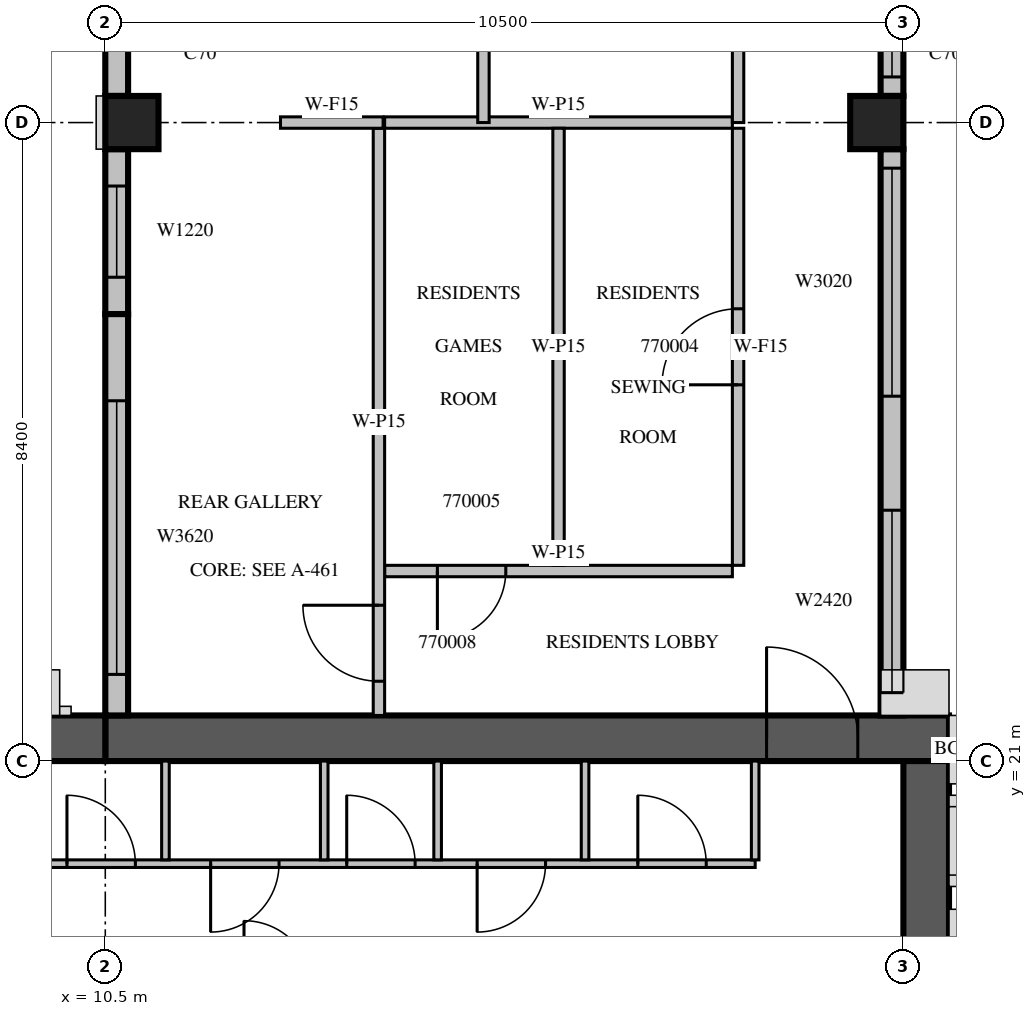
"""IFC4 building model, lengths in metres.
Left out: names, types, materials, properties, quantities, classifications, styles, units other than length and angle.
Written with IfcOpenShell. Run it as: python <this file> out.ifc"""

import sys

from ifc_helpers import new_model, si_unit, direction, frame, frame_2d, origin, origin_2d, place, context, subcontext, project, spatial, rectangle, extrude, source, transform, mapped, element, fill, save


model = new_model("IFC4")
c1 = context("Model", 3, precision=1e-05, world=origin(), true_north=direction((0.0, 1.0)))
c2 = subcontext(c1, "Body", "Model", "MODEL_VIEW")
j1 = project(units=[si_unit("LENGTHUNIT", "METRE"), si_unit("PLANEANGLEUNIT", "RADIAN")], contexts=[c1])
p1 = place(None, origin())
s1 = spatial("IfcSite", under=j1, at=p1, CompositionType="ELEMENT")
p2 = place(p1, origin())
s2 = spatial("IfcBuilding", under=s1, at=p2, CompositionType="ELEMENT")
p3 = place(p2, frame((0.0, 0.0, 305.5)))
s3 = spatial("IfcBuildingStorey", under=s2, at=p3, CompositionType="ELEMENT", Elevation=305.5)
m1 = source(origin(), c2, "Body", "SweptSolid", [
    extrude(rectangle(XDim=0.7, YDim=0.7, at=origin_2d()), origin(), (0.0, 0.0, 1.0), 3.5),
])
for number, where, z_axis, x_axis in (
    (1, (10.85, 29.4, 0.0), (0.0, 0.0, 1.0), (1.0, 0.0, 0.0)),
    (2, (20.65, 29.4, 0.0), (0.0, 0.0, 1.0), (1.0, 0.0, 0.0)),
):
    element("IfcColumn", number, at=place(p3, frame(where, z_axis=z_axis, x_axis=x_axis)), inside=s3, PredefinedType="COLUMN", context=c2, shape_type="MappedRepresentation", body=[
        mapped(m1, transform((0.0, 0.0, 0.0), scale=1.0)),
    ])
m2 = source(origin(), c2, "Body", "SweptSolid", [
    extrude(rectangle(XDim=11.1, YDim=0.6, at=frame_2d((5.55, 0.0))), origin(), (0.0, 0.0, 1.0), 3.5),
])
p4 = place(p3, frame((10.5, 21.3, 0.0), z_axis=(0.0, 0.0, 1.0), x_axis=(1.0, 0.0, 0.0)))
e3 = element("IfcWall", 3, at=p4, inside=s3, PredefinedType="SHEAR", context=c2, shape_type="MappedRepresentation", body=[
    mapped(m2, transform((0.0, 0.0, 0.0), scale=1.0)),
])
m3 = source(origin(), c2, "Body", "SweptSolid", [
    extrude(rectangle(XDim=1.2, YDim=2.1, at=frame_2d((0.6, 1.05))), frame((0.0, 0.31, 0.0), z_axis=(0.0, -1.0, 0.0), x_axis=(1.0, 0.0, 0.0)), (0.0, 0.0, 1.0), 0.62),
])
p5 = place(p4, frame((8.7, 0.0, 0.0)))
e4 = element("IfcOpeningElement", 4, at=p5, cuts=e3, PredefinedType="OPENING", context=c2, shape_type="MappedRepresentation", body=[
    mapped(m3, transform((0.0, 0.0, 0.0), scale=1.0)),
])
m4 = source(origin(), c2, "Body", "SweptSolid", [
    extrude(rectangle(XDim=10.5, YDim=0.6, at=frame_2d((5.25, 0.0))), origin(), (0.0, 0.0, 1.0), 3.5),
])
p6 = place(p3, frame((21.3, 10.5, 0.0), z_axis=(0.0, 0.0, 1.0), x_axis=(0.0, 1.0, 0.0)))
e5 = element("IfcWall", 5, at=p6, inside=s3, PredefinedType="SHEAR", context=c2, shape_type="MappedRepresentation", body=[
    mapped(m4, transform((0.0, 0.0, 0.0), scale=1.0)),
])
m5 = source(origin(), c2, "Body", "SweptSolid", [
    extrude(rectangle(XDim=1.2, YDim=2.4, at=frame_2d((0.6, 1.2))), frame((0.0, 0.31, 0.0), z_axis=(0.0, -1.0, 0.0), x_axis=(1.0, 0.0, 0.0)), (0.0, 0.0, 1.0), 0.62),
])
p7 = place(p6, frame((5.7, 0.0, 0.6)))
e6 = element("IfcOpeningElement", 6, at=p7, cuts=e5, PredefinedType="OPENING", context=c2, shape_type="MappedRepresentation", body=[
    mapped(m5, transform((0.0, 0.0, 0.0), scale=1.0)),
])
m6 = source(origin(), c2, "Body", "SweptSolid", [
    extrude(rectangle(XDim=6.6, YDim=0.6, at=frame_2d((3.3, 0.0))), origin(), (0.0, 0.0, 1.0), 3.5),
])
p8 = place(p3, frame((3.9, 21.3, 0.0), z_axis=(0.0, 0.0, 1.0), x_axis=(1.0, 0.0, 0.0)))
e7 = element("IfcWall", 7, at=p8, inside=s3, PredefinedType="SHEAR", context=c2, shape_type="MappedRepresentation", body=[
    mapped(m6, transform((0.0, 0.0, 0.0), scale=1.0)),
])
p9 = place(p8, frame((1.5, 0.0, 0.6)))
e8 = element("IfcOpeningElement", 8, at=p9, cuts=e7, PredefinedType="OPENING", context=c2, shape_type="MappedRepresentation", body=[
    mapped(m5, transform((0.0, 0.0, 0.0), scale=1.0)),
])
p10 = place(p8, frame((3.6, 0.0, 0.6)))
e9 = element("IfcOpeningElement", 9, at=p10, cuts=e7, PredefinedType="OPENING", context=c2, shape_type="MappedRepresentation", body=[
    mapped(m5, transform((0.0, 0.0, 0.0), scale=1.0)),
])
m7 = source(origin(), c2, "Body", "SweptSolid", [
    extrude(rectangle(XDim=7.45, YDim=0.3, at=frame_2d((3.725, 0.0))), origin(), (0.0, 0.0, 1.0), 3.1),
])
p11 = place(p3, frame((20.85, 21.6, 0.0), z_axis=(0.0, 0.0, 1.0), x_axis=(0.0, 1.0, 0.0)))
e10 = element("IfcWall", 10, at=p11, inside=s3, PredefinedType="STANDARD", context=c2, shape_type="MappedRepresentation", body=[
    mapped(m7, transform((0.0, 0.0, 0.0), scale=1.0)),
])
m8 = source(origin(), c2, "Body", "SweptSolid", [
    extrude(rectangle(XDim=2.4, YDim=2.0, at=frame_2d((1.2, 1.0))), frame((0.0, 0.16, 0.0), z_axis=(0.0, -1.0, 0.0), x_axis=(1.0, 0.0, 0.0)), (0.0, 0.0, 1.0), 0.32),
])
p12 = place(p11, frame((0.3, 0.0, 0.6)))
e11 = element("IfcOpeningElement", 11, at=p12, cuts=e10, PredefinedType="OPENING", context=c2, shape_type="MappedRepresentation", body=[
    mapped(m8, transform((0.0, 0.0, 0.0), scale=1.0)),
])
m9 = source(origin(), c2, "Body", "SweptSolid", [
    extrude(rectangle(XDim=3.0, YDim=2.0, at=frame_2d((1.5, 1.0))), frame((0.0, 0.16, 0.0), z_axis=(0.0, -1.0, 0.0), x_axis=(1.0, 0.0, 0.0)), (0.0, 0.0, 1.0), 0.32),
])
p13 = place(p11, frame((4.2, 0.0, 0.6)))
e12 = element("IfcOpeningElement", 12, at=p13, cuts=e10, PredefinedType="OPENING", context=c2, shape_type="MappedRepresentation", body=[
    mapped(m9, transform((0.0, 0.0, 0.0), scale=1.0)),
])
m10 = source(origin(), c2, "Body", "SweptSolid", [
    extrude(rectangle(XDim=7.7, YDim=0.3, at=frame_2d((3.85, 0.0))), origin(), (0.0, 0.0, 1.0), 3.1),
])
p14 = place(p3, frame((20.85, 29.75, 0.0), z_axis=(0.0, 0.0, 1.0), x_axis=(0.0, 1.0, 0.0)))
e13 = element("IfcWall", 13, at=p14, inside=s3, PredefinedType="STANDARD", context=c2, shape_type="MappedRepresentation", body=[
    mapped(m10, transform((0.0, 0.0, 0.0), scale=1.0)),
])
p15 = place(p14, frame((0.25, 0.0, 0.6)))
e14 = element("IfcOpeningElement", 14, at=p15, cuts=e13, PredefinedType="OPENING", context=c2, shape_type="MappedRepresentation", body=[
    mapped(m9, transform((0.0, 0.0, 0.0), scale=1.0)),
])
p16 = place(p14, frame((4.45, 0.0, 0.6)))
e15 = element("IfcOpeningElement", 15, at=p16, cuts=e13, PredefinedType="OPENING", context=c2, shape_type="MappedRepresentation", body=[
    mapped(m9, transform((0.0, 0.0, 0.0), scale=1.0)),
])
m11 = source(origin(), c2, "Body", "SweptSolid", [
    extrude(rectangle(XDim=1.33, YDim=0.3, at=frame_2d((0.665, 0.0))), origin(), (0.0, 0.0, 1.0), 3.1),
])
p17 = place(p3, frame((10.65, 31.08, 0.0), z_axis=(0.0, 0.0, 1.0), x_axis=(0.0, -1.0, 0.0)))
e16 = element("IfcWall", 16, at=p17, inside=s3, PredefinedType="STANDARD", context=c2, shape_type="MappedRepresentation", body=[
    mapped(m11, transform((0.0, 0.0, 0.0), scale=1.0)),
])
m12 = source(origin(), c2, "Body", "SweptSolid", [
    extrude(rectangle(XDim=2.17, YDim=0.3, at=frame_2d((1.085, 0.0))), origin(), (0.0, 0.0, 1.0), 3.1),
])
p18 = place(p3, frame((10.65, 29.05, 0.0), z_axis=(0.0, 0.0, 1.0), x_axis=(0.0, -1.0, 0.0)))
e17 = element("IfcWall", 17, at=p18, inside=s3, PredefinedType="STANDARD", context=c2, shape_type="MappedRepresentation", body=[
    mapped(m12, transform((0.0, 0.0, 0.0), scale=1.0)),
])
m13 = source(origin(), c2, "Body", "SweptSolid", [
    extrude(rectangle(XDim=1.2, YDim=2.0, at=frame_2d((0.6, 1.0))), frame((0.0, 0.16, 0.0), z_axis=(0.0, -1.0, 0.0), x_axis=(1.0, 0.0, 0.0)), (0.0, 0.0, 1.0), 0.32),
])
p19 = place(p18, frame((0.485, 0.0, 0.6)))
e18 = element("IfcOpeningElement", 18, at=p19, cuts=e17, PredefinedType="OPENING", context=c2, shape_type="MappedRepresentation", body=[
    mapped(m13, transform((0.0, 0.0, 0.0), scale=1.0)),
])
m14 = source(origin(), c2, "Body", "SweptSolid", [
    extrude(rectangle(XDim=5.28, YDim=0.3, at=frame_2d((2.64, 0.0))), origin(), (0.0, 0.0, 1.0), 3.1),
])
p20 = place(p3, frame((10.65, 26.88, 0.0), z_axis=(0.0, 0.0, 1.0), x_axis=(0.0, -1.0, 0.0)))
e19 = element("IfcWall", 19, at=p20, inside=s3, PredefinedType="STANDARD", context=c2, shape_type="MappedRepresentation", body=[
    mapped(m14, transform((0.0, 0.0, 0.0), scale=1.0)),
])
m15 = source(origin(), c2, "Body", "SweptSolid", [
    extrude(rectangle(XDim=3.6, YDim=2.0, at=frame_2d((1.8, 1.0))), frame((0.0, 0.16, 0.0), z_axis=(0.0, -1.0, 0.0), x_axis=(1.0, 0.0, 0.0)), (0.0, 0.0, 1.0), 0.32),
])
p21 = place(p20, frame((1.14, 0.0, 0.6)))
e20 = element("IfcOpeningElement", 20, at=p21, cuts=e19, PredefinedType="OPENING", context=c2, shape_type="MappedRepresentation", body=[
    mapped(m15, transform((0.0, 0.0, 0.0), scale=1.0)),
])
m16 = source(origin(), c2, "Body", "SweptSolid", [
    extrude(rectangle(XDim=9.4, YDim=0.1, at=frame_2d((4.7, 0.0))), origin(), (0.0, 0.0, 1.0), 3.1),
])
p22 = place(p3, frame((9.65, 19.65, 0.0), z_axis=(0.0, 0.0, 1.0), x_axis=(1.0, 0.0, 0.0)))
e21 = element("IfcWall", 21, at=p22, inside=s3, PredefinedType="PARTITIONING", context=c2, shape_type="MappedRepresentation", body=[
    mapped(m16, transform((0.0, 0.0, 0.0), scale=1.0)),
])
m17 = source(origin(), c2, "Body", "SweptSolid", [
    extrude(rectangle(XDim=0.9, YDim=2.1, at=frame_2d((0.45, 1.05))), frame((0.0, 0.06, 0.0), z_axis=(0.0, -1.0, 0.0), x_axis=(1.0, 0.0, 0.0)), (0.0, 0.0, 1.0), 0.12),
])
p23 = place(p22, frame((0.346, 0.0, 0.0)))
e22 = element("IfcOpeningElement", 22, at=p23, cuts=e21, PredefinedType="OPENING", context=c2, shape_type="MappedRepresentation", body=[
    mapped(m17, transform((0.0, 0.0, 0.0), scale=1.0)),
])
p24 = place(p22, frame((2.236, 0.0, 0.0)))
e23 = element("IfcOpeningElement", 23, at=p24, cuts=e21, PredefinedType="OPENING", context=c2, shape_type="MappedRepresentation", body=[
    mapped(m17, transform((0.0, 0.0, 0.0), scale=1.0)),
])
p25 = place(p22, frame((4.026, 0.0, 0.0)))
e24 = element("IfcOpeningElement", 24, at=p25, cuts=e21, PredefinedType="OPENING", context=c2, shape_type="MappedRepresentation", body=[
    mapped(m17, transform((0.0, 0.0, 0.0), scale=1.0)),
])
p26 = place(p22, frame((5.742, 0.0, 0.0)))
e25 = element("IfcOpeningElement", 25, at=p26, cuts=e21, PredefinedType="OPENING", context=c2, shape_type="MappedRepresentation", body=[
    mapped(m17, transform((0.0, 0.0, 0.0), scale=1.0)),
])
p27 = place(p22, frame((7.856, 0.0, 0.0)))
e26 = element("IfcOpeningElement", 26, at=p27, cuts=e21, PredefinedType="OPENING", context=c2, shape_type="MappedRepresentation", body=[
    mapped(m17, transform((0.0, 0.0, 0.0), scale=1.0)),
])
m18 = source(origin(), c2, "Body", "SweptSolid", [
    extrude(rectangle(XDim=1.3, YDim=0.1, at=frame_2d((0.65, 0.0))), origin(), (0.0, 0.0, 1.0), 3.1),
])
for number, where, z_axis, x_axis in (
    (27, (11.291, 19.7, 0.0), (0.0, 0.0, 1.0), (0.0, 1.0, 0.0)),
    (28, (13.38, 19.7, 0.0), (0.0, 0.0, 1.0), (0.0, 1.0, 0.0)),
    (29, (14.872, 19.7, 0.0), (0.0, 0.0, 1.0), (0.0, 1.0, 0.0)),
    (30, (16.812, 19.7, 0.0), (0.0, 0.0, 1.0), (0.0, 1.0, 0.0)),
    (31, (19.05, 19.7, 0.0), (0.0, 0.0, 1.0), (0.0, 1.0, 0.0)),
):
    element("IfcWall", number, at=place(p3, frame(where, z_axis=z_axis, x_axis=x_axis)), inside=s3, PredefinedType="PARTITIONING", context=c2, shape_type="MappedRepresentation", body=[
        mapped(m18, transform((0.0, 0.0, 0.0), scale=1.0)),
    ])
m19 = source(origin(), c2, "Body", "SweptSolid", [
    extrude(rectangle(XDim=4.575, YDim=0.15, at=frame_2d((2.288, 0.0))), origin(), (0.0, 0.0, 1.0), 3.1),
])
p28 = place(p3, frame((14.175, 23.5, 0.0), z_axis=(0.0, 0.0, 1.0), x_axis=(1.0, 0.0, 0.0)))
e32 = element("IfcWall", 32, at=p28, inside=s3, PredefinedType="PARTITIONING", context=c2, shape_type="MappedRepresentation", body=[
    mapped(m19, transform((0.0, 0.0, 0.0), scale=1.0)),
])
m20 = source(origin(), c2, "Body", "SweptSolid", [
    extrude(rectangle(XDim=0.9, YDim=2.1, at=frame_2d((0.45, 1.05))), frame((0.0, 0.085, 0.0), z_axis=(0.0, -1.0, 0.0), x_axis=(1.0, 0.0, 0.0)), (0.0, 0.0, 1.0), 0.17),
])
p29 = place(p28, frame((0.694, 0.0, 0.0)))
e33 = element("IfcOpeningElement", 33, at=p29, cuts=e32, PredefinedType="OPENING", context=c2, shape_type="MappedRepresentation", body=[
    mapped(m20, transform((0.0, 0.0, 0.0), scale=1.0)),
])
p30 = place(p3, frame((18.75, 29.4, 0.0), z_axis=(0.0, 0.0, 1.0), x_axis=(-1.0, 0.0, 0.0)))
e34 = element("IfcWall", 34, at=p30, inside=s3, PredefinedType="PARTITIONING", context=c2, shape_type="MappedRepresentation", body=[
    mapped(m19, transform((0.0, 0.0, 0.0), scale=1.0)),
])
m21 = source(origin(), c2, "Body", "SweptSolid", [
    extrude(rectangle(XDim=5.75, YDim=0.15, at=frame_2d((2.875, 0.0))), origin(), (0.0, 0.0, 1.0), 3.1),
])
p31 = place(p3, frame((18.825, 23.575, 0.0), z_axis=(0.0, 0.0, 1.0), x_axis=(0.0, 1.0, 0.0)))
e35 = element("IfcWall", 35, at=p31, inside=s3, PredefinedType="PARTITIONING", context=c2, shape_type="MappedRepresentation", body=[
    mapped(m21, transform((0.0, 0.0, 0.0), scale=1.0)),
])
m22 = source(origin(), c2, "Body", "SweptSolid", [
    extrude(rectangle(XDim=1.0, YDim=2.1, at=frame_2d((0.5, 1.05))), frame((0.0, 0.085, 0.0), z_axis=(0.0, -1.0, 0.0), x_axis=(1.0, 0.0, 0.0)), (0.0, 0.0, 1.0), 0.17),
])
p32 = place(p31, frame((2.375, 0.0, 0.0)))
e36 = element("IfcOpeningElement", 36, at=p32, cuts=e35, PredefinedType="OPENING", context=c2, shape_type="MappedRepresentation", body=[
    mapped(m22, transform((0.0, 0.0, 0.0), scale=1.0)),
])
p33 = place(p3, frame((16.463, 23.575, 0.0), z_axis=(0.0, 0.0, 1.0), x_axis=(0.0, 1.0, 0.0)))
e37 = element("IfcWall", 37, at=p33, inside=s3, PredefinedType="PARTITIONING", context=c2, shape_type="MappedRepresentation", body=[
    mapped(m21, transform((0.0, 0.0, 0.0), scale=1.0)),
])
m23 = source(origin(), c2, "Body", "SweptSolid", [
    extrude(rectangle(XDim=7.725, YDim=0.15, at=frame_2d((3.862, 0.0))), origin(), (0.0, 0.0, 1.0), 3.1),
])
p34 = place(p3, frame((14.1, 29.325, 0.0), z_axis=(0.0, 0.0, 1.0), x_axis=(0.0, -1.0, 0.0)))
e38 = element("IfcWall", 38, at=p34, inside=s3, PredefinedType="PARTITIONING", context=c2, shape_type="MappedRepresentation", body=[
    mapped(m23, transform((0.0, 0.0, 0.0), scale=1.0)),
])
p35 = place(p34, frame((6.275, 0.0, 0.0)))
e39 = element("IfcOpeningElement", 39, at=p35, cuts=e38, PredefinedType="OPENING", context=c2, shape_type="MappedRepresentation", body=[
    mapped(m22, transform((0.0, 0.0, 0.0), scale=1.0)),
])
m24 = source(origin(), c2, "Body", "SweptSolid", [
    extrude(rectangle(XDim=1.35, YDim=0.15, at=frame_2d((0.675, 0.0))), origin(), (0.0, 0.0, 1.0), 3.1),
])
p36 = place(p3, frame((14.155, 29.4, 0.0), z_axis=(0.0, 0.0, 1.0), x_axis=(-1.0, 0.0, 0.0)))
e40 = element("IfcWall", 40, at=p36, inside=s3, PredefinedType="PARTITIONING", context=c2, shape_type="MappedRepresentation", body=[
    mapped(m24, transform((0.0, 0.0, 0.0), scale=1.0)),
])
m25 = source(origin(), c2, "Body", "SweptSolid", [
    extrude(rectangle(XDim=8.4, YDim=0.15, at=frame_2d((4.2, 0.0))), origin(), (0.0, 0.0, 1.0), 3.1),
])
p37 = place(p3, frame((15.475, 29.4, 0.0), z_axis=(0.0, 0.0, 1.0), x_axis=(0.0, 1.0, 0.0)))
e41 = element("IfcWall", 41, at=p37, inside=s3, PredefinedType="PARTITIONING", context=c2, shape_type="MappedRepresentation", body=[
    mapped(m25, transform((0.0, 0.0, 0.0), scale=1.0)),
])
m26 = source(origin(), c2, "Body", "SweptSolid", [
    extrude(rectangle(XDim=1.2, YDim=2.1, at=frame_2d((0.6, 1.05))), frame((0.0, 0.085, 0.0), z_axis=(0.0, -1.0, 0.0), x_axis=(1.0, 0.0, 0.0)), (0.0, 0.0, 1.0), 0.17),
])
p38 = place(p37, frame((1.552, 0.0, 0.0)))
e42 = element("IfcOpeningElement", 42, at=p38, cuts=e41, PredefinedType="OPENING", context=c2, shape_type="MappedRepresentation", body=[
    mapped(m26, transform((0.0, 0.0, 0.0), scale=1.0)),
])
p39 = place(p3, frame((18.825, 29.4, 0.0), z_axis=(0.0, 0.0, 1.0), x_axis=(0.0, 1.0, 0.0)))
e43 = element("IfcWall", 43, at=p39, inside=s3, PredefinedType="PARTITIONING", context=c2, shape_type="MappedRepresentation", body=[
    mapped(m25, transform((0.0, 0.0, 0.0), scale=1.0)),
])
p40 = place(p39, frame((1.502, 0.0, 0.0)))
e44 = element("IfcOpeningElement", 44, at=p40, cuts=e43, PredefinedType="OPENING", context=c2, shape_type="MappedRepresentation", body=[
    mapped(m26, transform((0.0, 0.0, 0.0), scale=1.0)),
])
p41 = place(p39, frame((4.727, 0.0, 0.0)))
e45 = element("IfcOpeningElement", 45, at=p41, cuts=e43, PredefinedType="OPENING", context=c2, shape_type="MappedRepresentation", body=[
    mapped(m20, transform((0.0, 0.0, 0.0), scale=1.0)),
])
p42 = place(p39, frame((6.824, 0.0, 0.0)))
e46 = element("IfcOpeningElement", 46, at=p42, cuts=e43, PredefinedType="OPENING", context=c2, shape_type="MappedRepresentation", body=[
    mapped(m20, transform((0.0, 0.0, 0.0), scale=1.0)),
])
m27 = source(origin(), c2, "Body", "SweptSolid", [
    extrude(rectangle(XDim=2.4, YDim=2.0, at=frame_2d((1.2, 1.0))), frame((0.0, 0.03, 0.0), z_axis=(0.0, -1.0, 0.0), x_axis=(1.0, 0.0, 0.0)), (0.0, 0.0, 1.0), 0.06),
])
p43 = place(p12, origin())
e47 = element("IfcWindow", 47, at=p43, inside=s3, PartitioningType="SINGLE_PANEL", PredefinedType="WINDOW", context=c2, shape_type="MappedRepresentation", body=[
    mapped(m27, transform((0.0, 0.0, 0.0), scale=1.0)),
])
fill(e11, e47)
m28 = source(origin(), c2, "Body", "SweptSolid", [
    extrude(rectangle(XDim=3.0, YDim=2.0, at=frame_2d((1.5, 1.0))), frame((0.0, 0.03, 0.0), z_axis=(0.0, -1.0, 0.0), x_axis=(1.0, 0.0, 0.0)), (0.0, 0.0, 1.0), 0.06),
])
p44 = place(p13, origin())
e48 = element("IfcWindow", 48, at=p44, inside=s3, PartitioningType="SINGLE_PANEL", PredefinedType="WINDOW", context=c2, shape_type="MappedRepresentation", body=[
    mapped(m28, transform((0.0, 0.0, 0.0), scale=1.0)),
])
fill(e12, e48)
p45 = place(p15, origin())
e49 = element("IfcWindow", 49, at=p45, inside=s3, PartitioningType="SINGLE_PANEL", PredefinedType="WINDOW", context=c2, shape_type="MappedRepresentation", body=[
    mapped(m28, transform((0.0, 0.0, 0.0), scale=1.0)),
])
fill(e14, e49)
m29 = source(origin(), c2, "Body", "SweptSolid", [
    extrude(rectangle(XDim=1.2, YDim=2.0, at=frame_2d((0.6, 1.0))), frame((0.0, 0.03, 0.0), z_axis=(0.0, -1.0, 0.0), x_axis=(1.0, 0.0, 0.0)), (0.0, 0.0, 1.0), 0.06),
])
p46 = place(p19, origin())
e50 = element("IfcWindow", 50, at=p46, inside=s3, PartitioningType="SINGLE_PANEL", PredefinedType="WINDOW", context=c2, shape_type="MappedRepresentation", body=[
    mapped(m29, transform((0.0, 0.0, 0.0), scale=1.0)),
])
fill(e18, e50)
m30 = source(origin(), c2, "Body", "SweptSolid", [
    extrude(rectangle(XDim=3.6, YDim=2.0, at=frame_2d((1.8, 1.0))), frame((0.0, 0.03, 0.0), z_axis=(0.0, -1.0, 0.0), x_axis=(1.0, 0.0, 0.0)), (0.0, 0.0, 1.0), 0.06),
])
p47 = place(p21, origin())
e51 = element("IfcWindow", 51, at=p47, inside=s3, PartitioningType="SINGLE_PANEL", PredefinedType="WINDOW", context=c2, shape_type="MappedRepresentation", body=[
    mapped(m30, transform((0.0, 0.0, 0.0), scale=1.0)),
])
fill(e20, e51)
m31 = source(origin(), c2, "Body", "SweptSolid", [
    extrude(rectangle(XDim=0.9, YDim=2.1, at=frame_2d((0.45, 1.05))), frame((0.0, 0.025, 0.0), z_axis=(0.0, -1.0, 0.0), x_axis=(1.0, 0.0, 0.0)), (0.0, 0.0, 1.0), 0.05),
])
p48 = place(p23, origin())
e52 = element("IfcDoor", 52, at=p48, inside=s3, OperationType="SINGLE_SWING_LEFT", PredefinedType="DOOR", context=c2, shape_type="MappedRepresentation", body=[
    mapped(m31, transform((0.0, 0.0, 0.0), scale=1.0)),
])
fill(e22, e52)
p49 = place(p24, origin())
e53 = element("IfcDoor", 53, at=p49, inside=s3, OperationType="SINGLE_SWING_RIGHT", PredefinedType="DOOR", context=c2, shape_type="MappedRepresentation", body=[
    mapped(m31, transform((0.0, 0.0, 0.0), scale=1.0)),
])
fill(e23, e53)
p50 = place(p25, origin())
e54 = element("IfcDoor", 54, at=p50, inside=s3, OperationType="SINGLE_SWING_LEFT", PredefinedType="DOOR", context=c2, shape_type="MappedRepresentation", body=[
    mapped(m31, transform((0.0, 0.0, 0.0), scale=1.0)),
])
fill(e24, e54)
p51 = place(p26, origin())
e55 = element("IfcDoor", 55, at=p51, inside=s3, OperationType="SINGLE_SWING_RIGHT", PredefinedType="DOOR", context=c2, shape_type="MappedRepresentation", body=[
    mapped(m31, transform((0.0, 0.0, 0.0), scale=1.0)),
])
fill(e25, e55)
p52 = place(p27, origin())
e56 = element("IfcDoor", 56, at=p52, inside=s3, OperationType="SINGLE_SWING_LEFT", PredefinedType="DOOR", context=c2, shape_type="MappedRepresentation", body=[
    mapped(m31, transform((0.0, 0.0, 0.0), scale=1.0)),
])
fill(e26, e56)
m32 = source(origin(), c2, "Body", "SweptSolid", [
    extrude(rectangle(XDim=1.2, YDim=2.1, at=frame_2d((0.6, 1.05))), frame((0.0, 0.025, 0.0), z_axis=(0.0, -1.0, 0.0), x_axis=(1.0, 0.0, 0.0)), (0.0, 0.0, 1.0), 0.05),
])
p53 = place(p5, origin())
e57 = element("IfcDoor", 57, at=p53, inside=s3, OperationType="SINGLE_SWING_LEFT", PredefinedType="DOOR", context=c2, shape_type="MappedRepresentation", body=[
    mapped(m32, transform((0.0, 0.0, 0.0), scale=1.0)),
])
fill(e4, e57)
m33 = source(origin(), c2, "Body", "SweptSolid", [
    extrude(rectangle(XDim=1.0, YDim=2.1, at=frame_2d((0.5, 1.05))), frame((0.0, 0.025, 0.0), z_axis=(0.0, -1.0, 0.0), x_axis=(1.0, 0.0, 0.0)), (0.0, 0.0, 1.0), 0.05),
])
p54 = place(p32, origin())
e58 = element("IfcDoor", 58, at=p54, inside=s3, OperationType="SINGLE_SWING_LEFT", PredefinedType="DOOR", context=c2, shape_type="MappedRepresentation", body=[
    mapped(m33, transform((0.0, 0.0, 0.0), scale=1.0)),
])
fill(e36, e58)
p55 = place(p29, origin())
e59 = element("IfcDoor", 59, at=p55, inside=s3, OperationType="SINGLE_SWING_RIGHT", PredefinedType="DOOR", context=c2, shape_type="MappedRepresentation", body=[
    mapped(m31, transform((0.0, 0.0, 0.0), scale=1.0)),
])
fill(e33, e59)
p56 = place(p35, origin())
e60 = element("IfcDoor", 60, at=p56, inside=s3, OperationType="SINGLE_SWING_RIGHT", PredefinedType="DOOR", context=c2, shape_type="MappedRepresentation", body=[
    mapped(m33, transform((0.0, 0.0, 0.0), scale=1.0)),
])
fill(e39, e60)
save(model, sys.argv[1])
